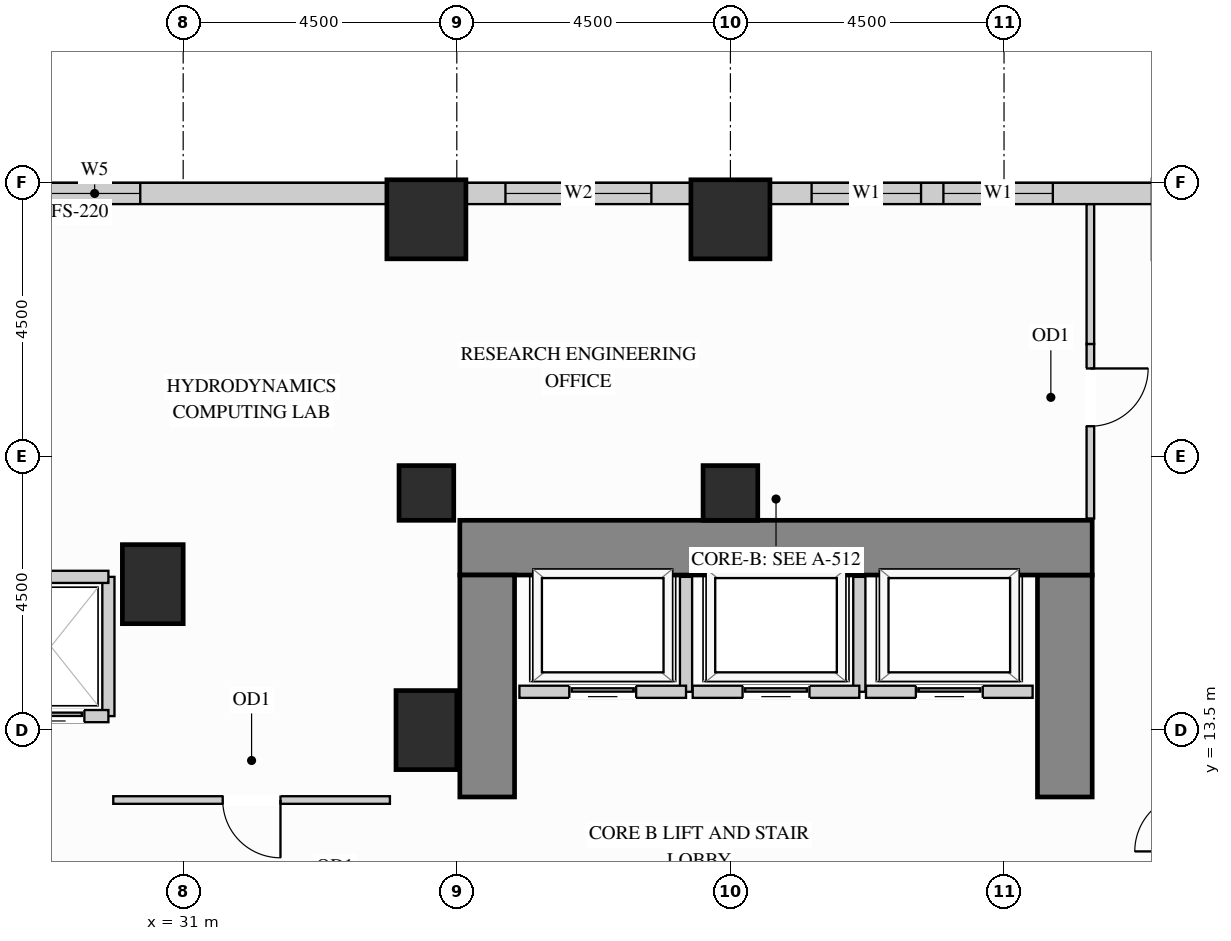
"""IFC4 building model, lengths in metres.
Left out: names, types, materials, properties, quantities, classifications, styles, units other than length and angle.
Written with IfcOpenShell. Run it as: python <this file> out.ifc"""

import sys

from ifc_helpers import new_model, si_unit, direction, frame, frame_2d, origin, origin_2d, place, context, subcontext, project, spatial, rectangle, extrude, source, transform, mapped, element, fill, save


model = new_model("IFC4")
c1 = context("Model", 3, precision=1e-05, world=origin(), true_north=direction((0.0, 1.0)))
c2 = subcontext(c1, "Body", "Model", "MODEL_VIEW")
j1 = project(units=[si_unit("LENGTHUNIT", "METRE"), si_unit("PLANEANGLEUNIT", "RADIAN")], contexts=[c1])
p1 = place(None, origin())
s1 = spatial("IfcSite", under=j1, at=p1, CompositionType="ELEMENT")
p2 = place(p1, origin())
s2 = spatial("IfcBuilding", under=s1, at=p2, CompositionType="ELEMENT")
p3 = place(p2, frame((0.0, 0.0, 58.5)))
s3 = spatial("IfcBuildingStorey", under=s2, at=p3, CompositionType="ELEMENT", Elevation=58.5)
m1 = source(origin(), c2, "Body", "SweptSolid", [
    extrude(rectangle(XDim=0.9, YDim=0.9, at=origin_2d()), origin(), (0.0, 0.0, 1.0), 3.38),
])
for number, where, z_axis, x_axis in (
    (1, (35.0, 17.4, 0.0), (0.0, 0.0, 1.0), (1.0, 0.0, 0.0)),
    (2, (40.0, 17.4, 0.0), (0.0, 0.0, 1.0), (1.0, 0.0, 0.0)),
):
    element("IfcColumn", number, at=place(p3, frame(where, z_axis=z_axis, x_axis=x_axis)), inside=s3, PredefinedType="COLUMN", context=c2, shape_type="MappedRepresentation", body=[
        mapped(m1, transform((0.0, 0.0, 0.0), x_axis=(1.0, 0.0, 0.0), y_axis=(0.0, 1.0, 0.0), z_axis=(0.0, 0.0, 1.0))),
    ])
m2 = source(origin(), c2, "Body", "SweptSolid", [
    extrude(rectangle(XDim=1.0, YDim=1.3, at=origin_2d()), origin(), (0.0, 0.0, 1.0), 3.38),
])
for number, where, z_axis, x_axis in (
    (3, (35.0, 13.5, 0.0), (0.0, 0.0, 1.0), (1.0, 0.0, 0.0)),
    (4, (30.5, 15.9, 0.0), (0.0, 0.0, 1.0), (1.0, 0.0, 0.0)),
):
    element("IfcColumn", number, at=place(p3, frame(where, z_axis=z_axis, x_axis=x_axis)), inside=s3, PredefinedType="COLUMN", context=c2, shape_type="MappedRepresentation", body=[
        mapped(m2, transform((0.0, 0.0, 0.0), x_axis=(1.0, 0.0, 0.0), y_axis=(0.0, 1.0, 0.0), z_axis=(0.0, 0.0, 1.0))),
    ])
m3 = source(origin(), c2, "Body", "SweptSolid", [
    extrude(rectangle(XDim=1.3, YDim=1.3, at=origin_2d()), origin(), (0.0, 0.0, 1.0), 3.38),
])
for number, where, z_axis, x_axis in (
    (5, (35.0, 21.9, 0.0), (0.0, 0.0, 1.0), (1.0, 0.0, 0.0)),
    (6, (40.0, 21.9, 0.0), (0.0, 0.0, 1.0), (1.0, 0.0, 0.0)),
):
    element("IfcColumn", number, at=place(p3, frame(where, z_axis=z_axis, x_axis=x_axis)), inside=s3, PredefinedType="COLUMN", context=c2, shape_type="MappedRepresentation", body=[
        mapped(m3, transform((0.0, 0.0, 0.0), x_axis=(1.0, 0.0, 0.0), y_axis=(0.0, 1.0, 0.0), z_axis=(0.0, 0.0, 1.0))),
    ])
m4 = source(origin(), c2, "Body", "SweptSolid", [
    extrude(rectangle(XDim=3.65, YDim=0.9, at=frame_2d((1.825, 0.0))), origin(), (0.0, 0.0, 1.0), 3.38),
])
p4 = place(p3, frame((45.5, 12.4, 0.0), z_axis=(0.0, 0.0, 1.0), x_axis=(0.0, 1.0, 0.0)))
e7 = element("IfcWall", 7, at=p4, inside=s3, PredefinedType="SHEAR", context=c2, shape_type="MappedRepresentation", body=[
    mapped(m4, transform((0.0, 0.0, 0.0), x_axis=(1.0, 0.0, 0.0), y_axis=(0.0, 1.0, 0.0), z_axis=(0.0, 0.0, 1.0))),
])
m5 = source(origin(), c2, "Body", "SweptSolid", [
    extrude(rectangle(XDim=10.4, YDim=0.9, at=frame_2d((5.2, 0.0))), origin(), (0.0, 0.0, 1.0), 3.38),
])
p5 = place(p3, frame((35.55, 16.5, 0.0), z_axis=(0.0, 0.0, 1.0), x_axis=(1.0, 0.0, 0.0)))
e8 = element("IfcWall", 8, at=p5, inside=s3, PredefinedType="SHEAR", context=c2, shape_type="MappedRepresentation", body=[
    mapped(m5, transform((0.0, 0.0, 0.0), x_axis=(1.0, 0.0, 0.0), y_axis=(0.0, 1.0, 0.0), z_axis=(0.0, 0.0, 1.0))),
])
p6 = place(p3, frame((36.0, 12.4, 0.0), z_axis=(0.0, 0.0, 1.0), x_axis=(0.0, 1.0, 0.0)))
e9 = element("IfcWall", 9, at=p6, inside=s3, PredefinedType="SHEAR", context=c2, shape_type="MappedRepresentation", body=[
    mapped(m4, transform((0.0, 0.0, 0.0), x_axis=(1.0, 0.0, 0.0), y_axis=(0.0, 1.0, 0.0), z_axis=(0.0, 0.0, 1.0))),
])
p7 = place(p3, frame((46.952, 22.325, 0.0), z_axis=(0.0, 0.0, 1.0), x_axis=(-1.0, 0.0, 0.0)))
e10 = element("IfcWall", 10, at=p7, inside=s3, PredefinedType="SOLIDWALL", context=c2, shape_type="SweptSolid", body=[
    extrude(rectangle(XDim=6.304, YDim=0.35, at=frame_2d((3.152, 0.0))), origin(), (0.0, 0.0, 1.0), 2.51),
])
p8 = place(p7, frame((1.649, 0.0, 0.78)))
e11 = element("IfcOpeningElement", 11, at=p8, cuts=e10, PredefinedType="OPENING", context=c2, shape_type="SweptSolid", body=[
    extrude(rectangle(XDim=1.8, YDim=1.55, at=frame_2d((0.9, 0.775))), frame((0.0, 0.185, 0.0), z_axis=(0.0, -1.0, 0.0), x_axis=(1.0, 0.0, 0.0)), (0.0, 0.0, 1.0), 0.37),
])
p9 = place(p7, frame((3.817, 0.0, 0.78)))
e12 = element("IfcOpeningElement", 12, at=p9, cuts=e10, PredefinedType="OPENING", context=c2, shape_type="SweptSolid", body=[
    extrude(rectangle(XDim=1.8, YDim=1.55, at=frame_2d((0.9, 0.775))), frame((0.0, 0.185, 0.0), z_axis=(0.0, -1.0, 0.0), x_axis=(1.0, 0.0, 0.0)), (0.0, 0.0, 1.0), 0.37),
])
p10 = place(p3, frame((39.352, 22.325, 0.0), z_axis=(0.0, 0.0, 1.0), x_axis=(-1.0, 0.0, 0.0)))
e13 = element("IfcWall", 13, at=p10, inside=s3, PredefinedType="SOLIDWALL", context=c2, shape_type="SweptSolid", body=[
    extrude(rectangle(XDim=3.704, YDim=0.35, at=frame_2d((1.852, 0.0))), origin(), (0.0, 0.0, 1.0), 2.51),
])
p11 = place(p10, frame((0.652, 0.0, 0.78)))
e14 = element("IfcOpeningElement", 14, at=p11, cuts=e13, PredefinedType="OPENING", context=c2, shape_type="SweptSolid", body=[
    extrude(rectangle(XDim=2.4, YDim=1.55, at=frame_2d((1.2, 0.775))), frame((0.0, 0.185, 0.0), z_axis=(0.0, -1.0, 0.0), x_axis=(1.0, 0.0, 0.0)), (0.0, 0.0, 1.0), 0.37),
])
p12 = place(p3, frame((34.352, 22.325, 0.0), z_axis=(0.0, 0.0, 1.0), x_axis=(-1.0, 0.0, 0.0)))
e15 = element("IfcWall", 15, at=p12, inside=s3, PredefinedType="SOLIDWALL", context=c2, shape_type="SweptSolid", body=[
    extrude(rectangle(XDim=14.854, YDim=0.35, at=frame_2d((7.427, 0.0))), origin(), (0.0, 0.0, 1.0), 3.365),
])
p13 = place(p12, frame((4.058, 0.0, 0.78)))
e16 = element("IfcOpeningElement", 16, at=p13, cuts=e15, PredefinedType="OPENING", context=c2, shape_type="SweptSolid", body=[
    extrude(rectangle(XDim=1.5, YDim=2.0, at=frame_2d((0.75, 1.0))), frame((0.0, 0.185, 0.0), z_axis=(0.0, -1.0, 0.0), x_axis=(1.0, 0.0, 0.0)), (0.0, 0.0, 1.0), 0.37),
])
p14 = place(p12, frame((9.296, 0.0, 0.78)))
e17 = element("IfcOpeningElement", 17, at=p14, cuts=e15, PredefinedType="OPENING", context=c2, shape_type="SweptSolid", body=[
    extrude(rectangle(XDim=1.5, YDim=2.0, at=frame_2d((0.75, 1.0))), frame((0.0, 0.185, 0.0), z_axis=(0.0, -1.0, 0.0), x_axis=(1.0, 0.0, 0.0)), (0.0, 0.0, 1.0), 0.37),
])
p15 = place(p3, frame((45.92, 16.98, 0.0), z_axis=(0.0, 0.0, 1.0), x_axis=(0.0, 1.0, 0.0)))
e18 = element("IfcWall", 18, at=p15, inside=s3, PredefinedType="PARTITIONING", context=c2, shape_type="SweptSolid", body=[
    extrude(rectangle(XDim=2.87, YDim=0.125, at=frame_2d((1.435, 0.0))), origin(), (0.0, 0.0, 1.0), 3.365),
])
p16 = place(p15, frame((1.517, 0.0, 0.0)))
e19 = element("IfcOpeningElement", 19, at=p16, cuts=e18, PredefinedType="OPENING", context=c2, shape_type="SweptSolid", body=[
    extrude(rectangle(XDim=0.95, YDim=2.15, at=frame_2d((0.475, 1.075))), frame((0.0, 0.073, 0.0), z_axis=(0.0, -1.0, 0.0), x_axis=(1.0, 0.0, 0.0)), (0.0, 0.0, 1.0), 0.145),
])
m6 = source(origin(), c2, "Body", "SweptSolid", [
    extrude(rectangle(XDim=2.298, YDim=0.125, at=frame_2d((1.149, 0.0))), origin(), (0.0, 0.0, 1.0), 3.365),
])
p17 = place(p3, frame((45.92, 19.85, 0.0), z_axis=(0.0, 0.0, 1.0), x_axis=(0.0, 1.0, 0.0)))
e20 = element("IfcWall", 20, at=p17, inside=s3, PredefinedType="PARTITIONING", context=c2, shape_type="MappedRepresentation", body=[
    mapped(m6, transform((0.0, 0.0, 0.0), x_axis=(1.0, 0.0, 0.0), y_axis=(0.0, 1.0, 0.0), z_axis=(0.0, 0.0, 1.0))),
])
p18 = place(p3, frame((29.85, 12.35, 0.0), z_axis=(0.0, 0.0, 1.0), x_axis=(1.0, 0.0, 0.0)))
e21 = element("IfcWall", 21, at=p18, inside=s3, PredefinedType="PARTITIONING", context=c2, shape_type="SweptSolid", body=[
    extrude(rectangle(XDim=4.55, YDim=0.125, at=frame_2d((2.275, 0.0))), origin(), (0.0, 0.0, 1.0), 3.365),
])
p19 = place(p18, frame((1.8, 0.0, 0.0)))
e22 = element("IfcOpeningElement", 22, at=p19, cuts=e21, PredefinedType="OPENING", context=c2, shape_type="SweptSolid", body=[
    extrude(rectangle(XDim=0.95, YDim=2.15, at=frame_2d((0.475, 1.075))), frame((0.0, 0.073, 0.0), z_axis=(0.0, -1.0, 0.0), x_axis=(1.0, 0.0, 0.0)), (0.0, 0.0, 1.0), 0.145),
])
m7 = source(origin(), c2, "Body", "SweptSolid", [
    extrude(rectangle(XDim=1.89, YDim=0.2, at=frame_2d((0.945, 0.0))), origin(), (0.0, 0.0, 1.0), 3.365),
])
p20 = place(p3, frame((39.27, 14.13, 0.0), z_axis=(0.0, 0.0, 1.0), x_axis=(0.0, 1.0, 0.0)))
e23 = element("IfcWall", 23, at=p20, inside=s3, PredefinedType="PARTITIONING", context=c2, shape_type="MappedRepresentation", body=[
    mapped(m7, transform((0.0, 0.0, 0.0), x_axis=(1.0, 0.0, 0.0), y_axis=(0.0, 1.0, 0.0), z_axis=(0.0, 0.0, 1.0))),
])
p21 = place(p3, frame((36.53, 14.13, 0.0), z_axis=(0.0, 0.0, 1.0), x_axis=(1.0, 0.0, 0.0)))
e24 = element("IfcWall", 24, at=p21, inside=s3, PredefinedType="PARTITIONING", context=c2, shape_type="SweptSolid", body=[
    extrude(rectangle(XDim=2.74, YDim=0.2, at=frame_2d((1.37, 0.0))), origin(), (0.0, 0.0, 1.0), 3.365),
])
p22 = place(p21, frame((0.82, 0.0, 0.0)))
e25 = element("IfcOpeningElement", 25, at=p22, cuts=e24, PredefinedType="OPENING", context=c2, shape_type="SweptSolid", body=[
    extrude(rectangle(XDim=1.1, YDim=2.2, at=frame_2d((0.55, 1.1))), frame((0.0, 0.11, 0.0), z_axis=(0.0, -1.0, 0.0), x_axis=(1.0, 0.0, 0.0)), (0.0, 0.0, 1.0), 0.22),
])
p23 = place(p3, frame((42.12, 14.13, 0.0), z_axis=(0.0, 0.0, 1.0), x_axis=(0.0, 1.0, 0.0)))
e26 = element("IfcWall", 26, at=p23, inside=s3, PredefinedType="PARTITIONING", context=c2, shape_type="MappedRepresentation", body=[
    mapped(m7, transform((0.0, 0.0, 0.0), x_axis=(1.0, 0.0, 0.0), y_axis=(0.0, 1.0, 0.0), z_axis=(0.0, 0.0, 1.0))),
])
p24 = place(p3, frame((39.38, 14.13, 0.0), z_axis=(0.0, 0.0, 1.0), x_axis=(1.0, 0.0, 0.0)))
e27 = element("IfcWall", 27, at=p24, inside=s3, PredefinedType="PARTITIONING", context=c2, shape_type="SweptSolid", body=[
    extrude(rectangle(XDim=2.74, YDim=0.2, at=frame_2d((1.37, 0.0))), origin(), (0.0, 0.0, 1.0), 3.365),
])
p25 = place(p24, frame((0.82, 0.0, 0.0)))
e28 = element("IfcOpeningElement", 28, at=p25, cuts=e27, PredefinedType="OPENING", context=c2, shape_type="SweptSolid", body=[
    extrude(rectangle(XDim=1.1, YDim=2.2, at=frame_2d((0.55, 1.1))), frame((0.0, 0.11, 0.0), z_axis=(0.0, -1.0, 0.0), x_axis=(1.0, 0.0, 0.0)), (0.0, 0.0, 1.0), 0.22),
])
p26 = place(p3, frame((42.23, 14.13, 0.0), z_axis=(0.0, 0.0, 1.0), x_axis=(1.0, 0.0, 0.0)))
e29 = element("IfcWall", 29, at=p26, inside=s3, PredefinedType="PARTITIONING", context=c2, shape_type="SweptSolid", body=[
    extrude(rectangle(XDim=2.74, YDim=0.2, at=frame_2d((1.37, 0.0))), origin(), (0.0, 0.0, 1.0), 3.365),
])
p27 = place(p26, frame((0.82, 0.0, 0.0)))
e30 = element("IfcOpeningElement", 30, at=p27, cuts=e29, PredefinedType="OPENING", context=c2, shape_type="SweptSolid", body=[
    extrude(rectangle(XDim=1.1, YDim=2.2, at=frame_2d((0.55, 1.1))), frame((0.0, 0.11, 0.0), z_axis=(0.0, -1.0, 0.0), x_axis=(1.0, 0.0, 0.0)), (0.0, 0.0, 1.0), 0.22),
])
m8 = source(origin(), c2, "Body", "SweptSolid", [
    extrude(rectangle(XDim=2.29, YDim=0.2, at=frame_2d((1.145, 0.0))), origin(), (0.0, 0.0, 1.0), 3.365),
])
p28 = place(p3, frame((29.77, 13.73, 0.0), z_axis=(0.0, 0.0, 1.0), x_axis=(0.0, 1.0, 0.0)))
e31 = element("IfcWall", 31, at=p28, inside=s3, PredefinedType="PARTITIONING", context=c2, shape_type="MappedRepresentation", body=[
    mapped(m8, transform((0.0, 0.0, 0.0), x_axis=(1.0, 0.0, 0.0), y_axis=(0.0, 1.0, 0.0), z_axis=(0.0, 0.0, 1.0))),
])
m9 = source(origin(), c2, "Body", "SweptSolid", [
    extrude(rectangle(XDim=1.89, YDim=0.2, at=frame_2d((0.945, 0.0))), origin(), (0.0, 0.0, 1.0), 2.67),
])
p29 = place(p3, frame((27.88, 16.02, 0.0), z_axis=(0.0, 0.0, 1.0), x_axis=(1.0, 0.0, 0.0)))
e32 = element("IfcWall", 32, at=p29, inside=s3, PredefinedType="PARTITIONING", context=c2, shape_type="MappedRepresentation", body=[
    mapped(m9, transform((0.0, 0.0, 0.0), x_axis=(1.0, 0.0, 0.0), y_axis=(0.0, 1.0, 0.0), z_axis=(0.0, 0.0, 1.0))),
])
p30 = place(p3, frame((27.88, 13.73, 0.0), z_axis=(0.0, 0.0, 1.0), x_axis=(1.0, 0.0, 0.0)))
e33 = element("IfcWall", 33, at=p30, inside=s3, PredefinedType="PARTITIONING", context=c2, shape_type="SweptSolid", body=[
    extrude(rectangle(XDim=1.89, YDim=0.2, at=frame_2d((0.945, 0.0))), origin(), (0.0, 0.0, 1.0), 2.446),
])
p31 = place(p30, frame((0.395, 0.0, 0.0)))
e34 = element("IfcOpeningElement", 34, at=p31, cuts=e33, PredefinedType="OPENING", context=c2, shape_type="SweptSolid", body=[
    extrude(rectangle(XDim=1.1, YDim=2.2, at=frame_2d((0.55, 1.1))), frame((0.0, 0.11, 0.0), z_axis=(0.0, -1.0, 0.0), x_axis=(1.0, 0.0, 0.0)), (0.0, 0.0, 1.0), 0.22),
])
m10 = source(origin(), c2, "Body", "SweptSolid", [
    extrude(rectangle(XDim=1.1, YDim=2.2, at=frame_2d((0.55, 1.1))), frame((0.0, 0.025, 0.0), z_axis=(0.0, -1.0, 0.0), x_axis=(1.0, 0.0, 0.0)), (0.0, 0.0, 1.0), 0.05),
])
p32 = place(p22, origin())
e35 = element("IfcDoor", 35, at=p32, inside=s3, OperationType="SLIDING_TO_LEFT", PredefinedType="DOOR", context=c2, shape_type="MappedRepresentation", body=[
    mapped(m10, transform((0.0, 0.0, 0.0), x_axis=(1.0, 0.0, 0.0), y_axis=(0.0, 1.0, 0.0), z_axis=(0.0, 0.0, 1.0))),
])
fill(e25, e35)
p33 = place(p25, origin())
e36 = element("IfcDoor", 36, at=p33, inside=s3, OperationType="SLIDING_TO_LEFT", PredefinedType="DOOR", context=c2, shape_type="MappedRepresentation", body=[
    mapped(m10, transform((0.0, 0.0, 0.0), x_axis=(1.0, 0.0, 0.0), y_axis=(0.0, 1.0, 0.0), z_axis=(0.0, 0.0, 1.0))),
])
fill(e28, e36)
p34 = place(p27, origin())
e37 = element("IfcDoor", 37, at=p34, inside=s3, OperationType="SLIDING_TO_LEFT", PredefinedType="DOOR", context=c2, shape_type="MappedRepresentation", body=[
    mapped(m10, transform((0.0, 0.0, 0.0), x_axis=(1.0, 0.0, 0.0), y_axis=(0.0, 1.0, 0.0), z_axis=(0.0, 0.0, 1.0))),
])
fill(e30, e37)
p35 = place(p31, origin())
e38 = element("IfcDoor", 38, at=p35, inside=s3, OperationType="SLIDING_TO_LEFT", PredefinedType="DOOR", context=c2, shape_type="MappedRepresentation", body=[
    mapped(m10, transform((0.0, 0.0, 0.0), x_axis=(1.0, 0.0, 0.0), y_axis=(0.0, 1.0, 0.0), z_axis=(0.0, 0.0, 1.0))),
])
fill(e34, e38)
m11 = source(origin(), c2, "Body", "SweptSolid", [
    extrude(rectangle(XDim=0.95, YDim=2.15, at=frame_2d((0.475, 1.075))), frame((0.0, 0.025, 0.0), z_axis=(0.0, -1.0, 0.0), x_axis=(1.0, 0.0, 0.0)), (0.0, 0.0, 1.0), 0.05),
])
p36 = place(p16, origin())
e39 = element("IfcDoor", 39, at=p36, inside=s3, OperationType="SINGLE_SWING_RIGHT", PredefinedType="DOOR", context=c2, shape_type="MappedRepresentation", body=[
    mapped(m11, transform((0.0, 0.0, 0.0), x_axis=(1.0, 0.0, 0.0), y_axis=(0.0, 1.0, 0.0), z_axis=(0.0, 0.0, 1.0))),
])
fill(e19, e39)
p37 = place(p19, origin())
e40 = element("IfcDoor", 40, at=p37, inside=s3, OperationType="SINGLE_SWING_RIGHT", PredefinedType="DOOR", context=c2, shape_type="MappedRepresentation", body=[
    mapped(m11, transform((0.0, 0.0, 0.0), x_axis=(1.0, 0.0, 0.0), y_axis=(0.0, 1.0, 0.0), z_axis=(0.0, 0.0, 1.0))),
])
fill(e22, e40)
m12 = source(origin(), c2, "Body", "SweptSolid", [
    extrude(rectangle(XDim=1.8, YDim=1.55, at=frame_2d((0.9, 0.775))), frame((0.0, 0.03, 0.0), z_axis=(0.0, -1.0, 0.0), x_axis=(1.0, 0.0, 0.0)), (0.0, 0.0, 1.0), 0.06),
])
p38 = place(p8, origin())
e41 = element("IfcWindow", 41, at=p38, inside=s3, PartitioningType="SINGLE_PANEL", PredefinedType="WINDOW", context=c2, shape_type="MappedRepresentation", body=[
    mapped(m12, transform((0.0, 0.0, 0.0), x_axis=(1.0, 0.0, 0.0), y_axis=(0.0, 1.0, 0.0), z_axis=(0.0, 0.0, 1.0))),
])
fill(e11, e41)
p39 = place(p9, origin())
e42 = element("IfcWindow", 42, at=p39, inside=s3, PartitioningType="SINGLE_PANEL", PredefinedType="WINDOW", context=c2, shape_type="MappedRepresentation", body=[
    mapped(m12, transform((0.0, 0.0, 0.0), x_axis=(1.0, 0.0, 0.0), y_axis=(0.0, 1.0, 0.0), z_axis=(0.0, 0.0, 1.0))),
])
fill(e12, e42)
m13 = source(origin(), c2, "Body", "SweptSolid", [
    extrude(rectangle(XDim=2.4, YDim=1.55, at=frame_2d((1.2, 0.775))), frame((0.0, 0.03, 0.0), z_axis=(0.0, -1.0, 0.0), x_axis=(1.0, 0.0, 0.0)), (0.0, 0.0, 1.0), 0.06),
])
p40 = place(p11, origin())
e43 = element("IfcWindow", 43, at=p40, inside=s3, PartitioningType="SINGLE_PANEL", PredefinedType="WINDOW", context=c2, shape_type="MappedRepresentation", body=[
    mapped(m13, transform((0.0, 0.0, 0.0), x_axis=(1.0, 0.0, 0.0), y_axis=(0.0, 1.0, 0.0), z_axis=(0.0, 0.0, 1.0))),
])
fill(e14, e43)
m14 = source(origin(), c2, "Body", "SweptSolid", [
    extrude(rectangle(XDim=1.5, YDim=2.0, at=frame_2d((0.75, 1.0))), frame((0.0, 0.03, 0.0), z_axis=(0.0, -1.0, 0.0), x_axis=(1.0, 0.0, 0.0)), (0.0, 0.0, 1.0), 0.06),
])
p41 = place(p13, origin())
e44 = element("IfcWindow", 44, at=p41, inside=s3, PartitioningType="SINGLE_PANEL", PredefinedType="WINDOW", context=c2, shape_type="MappedRepresentation", body=[
    mapped(m14, transform((0.0, 0.0, 0.0), x_axis=(1.0, 0.0, 0.0), y_axis=(0.0, 1.0, 0.0), z_axis=(0.0, 0.0, 1.0))),
])
fill(e16, e44)
save(model, sys.argv[1])
